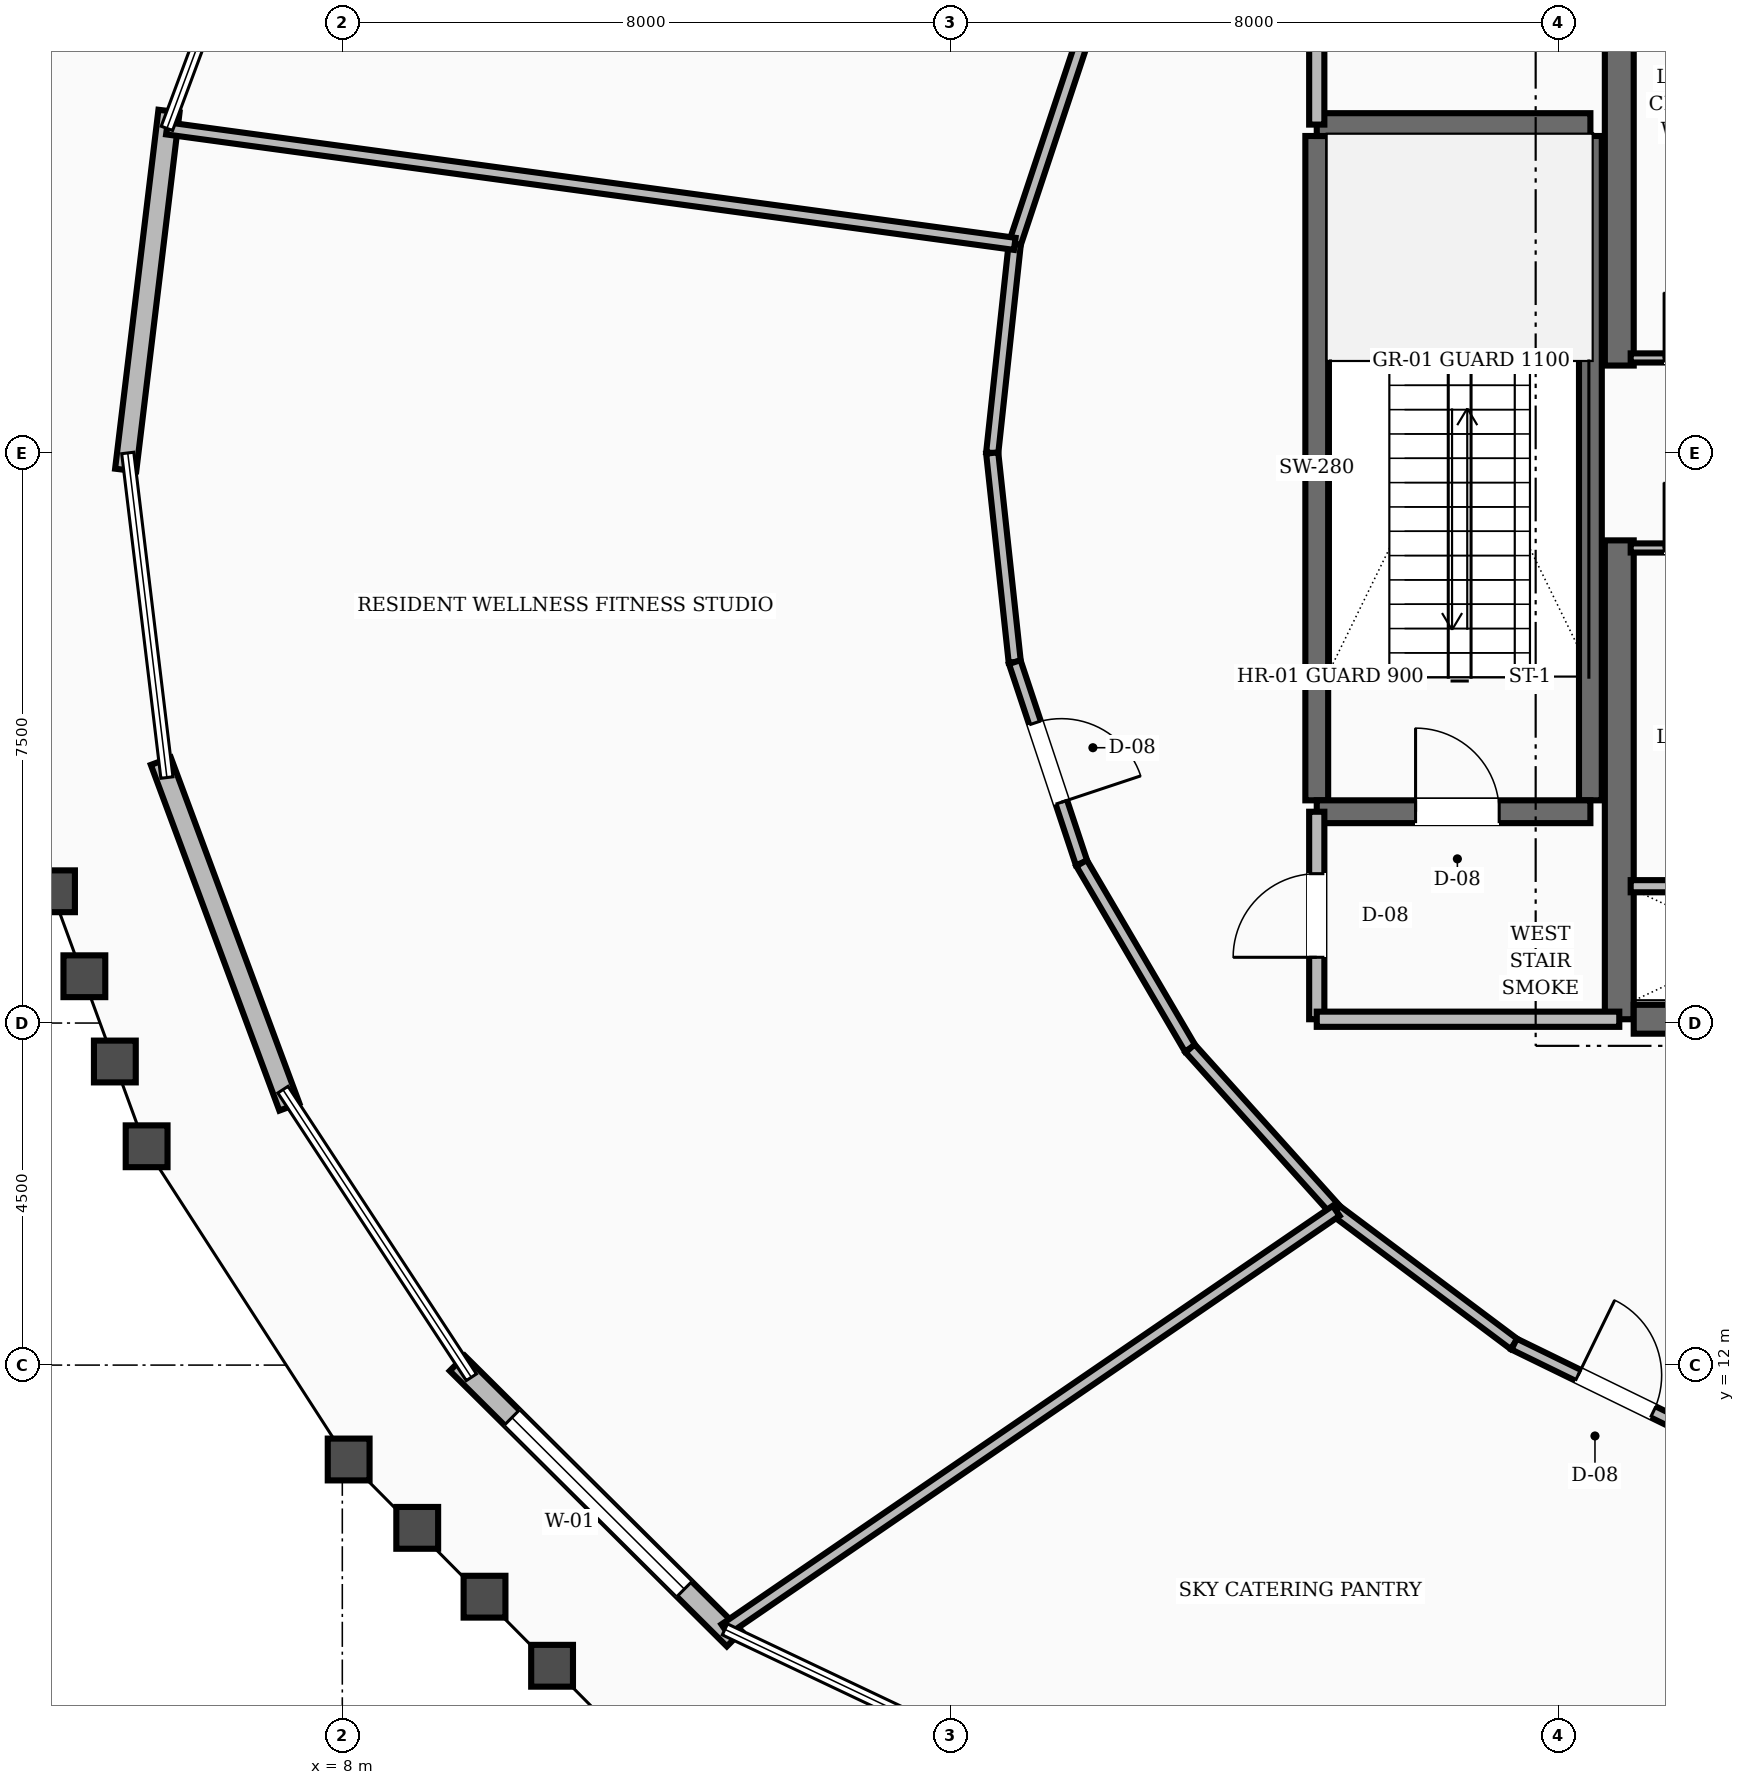
"""IFC4 building model, lengths in metres.
Left out: names, types, materials, properties, quantities, classifications, styles, units other than length and angle.
Written with IfcOpenShell. Run it as: python <this file> out.ifc"""

import sys

from ifc_helpers import new_model, si_unit, direction, frame, frame_2d, origin, place, context, subcontext, project, spatial, rectangle, extrude, element, fill, save


model = new_model("IFC4")
c1 = context("Model", 3, precision=1e-05, world=origin(), true_north=direction((0.0, 1.0)))
c2 = subcontext(c1, "Body", "Model", "MODEL_VIEW")
j1 = project(units=[si_unit("LENGTHUNIT", "METRE"), si_unit("PLANEANGLEUNIT", "RADIAN")], contexts=[c1])
p1 = place(None, origin())
s1 = spatial("IfcSite", under=j1, at=p1, CompositionType="ELEMENT")
p2 = place(p1, origin())
s2 = spatial("IfcBuilding", under=s1, at=p2, CompositionType="ELEMENT")
p3 = place(p2, frame((0.0, 0.0, 106.0)))
s3 = spatial("IfcBuildingStorey", under=s2, at=p3, CompositionType="ELEMENT", Elevation=106.0)
for number, where, z_axis, x_axis in (
    (1, (24.8, 16.55, 0.0), (0.0, 0.0, 1.0), (0.0, 1.0, 0.0)),
    (2, (24.8, 25.15, 0.0), (0.0, 0.0, 1.0), (0.0, 1.0, 0.0)),
):
    element("IfcWall", number, at=place(p3, frame(where, z_axis=z_axis, x_axis=x_axis)), inside=s3, PredefinedType="SHEAR", context=c2, shape_type="SweptSolid", body=[
        extrude(rectangle(XDim=6.3, YDim=0.38, at=frame_2d((3.15, 0.0))), origin(), (0.0, 0.0, 1.0), 4.8),
    ])
p4 = place(p3, frame((24.99, 16.55, 0.0), z_axis=(0.0, 0.0, 1.0), x_axis=(1.0, 0.0, 0.0)))
e3 = element("IfcWall", 3, at=p4, inside=s3, PredefinedType="SHEAR", context=c2, shape_type="SweptSolid", body=[
    extrude(rectangle(XDim=3.21, YDim=0.38, at=frame_2d((1.605, 0.0))), origin(), (0.0, 0.0, 1.0), 4.8),
])
for number, where, z_axis, x_axis in (
    (4, (20.82, 19.43, 0.0), (0.0, 0.0, 1.0), (0.0, 1.0, 0.0)),
    (5, (24.42, 19.43, 0.0), (0.0, 0.0, 1.0), (0.0, 1.0, 0.0)),
):
    element("IfcWall", number, at=place(p3, frame(where, z_axis=z_axis, x_axis=x_axis)), inside=s3, PredefinedType="SHEAR", context=c2, shape_type="SweptSolid", body=[
        extrude(rectangle(XDim=8.74, YDim=0.3, at=frame_2d((4.37, 0.0))), origin(), (0.0, 0.0, 1.0), 4.8),
    ])
p5 = place(p3, frame((20.82, 19.28, 0.0), z_axis=(0.0, 0.0, 1.0), x_axis=(1.0, 0.0, 0.0)))
e6 = element("IfcWall", 6, at=p5, inside=s3, PredefinedType="SHEAR", context=c2, shape_type="SweptSolid", body=[
    extrude(rectangle(XDim=3.6, YDim=0.3, at=frame_2d((1.8, 0.0))), origin(), (0.0, 0.0, 1.0), 4.8),
])
p6 = place(p5, frame((1.3, 0.0, 0.0)))
e7 = element("IfcOpeningElement", 7, at=p6, cuts=e6, PredefinedType="OPENING", context=c2, shape_type="SweptSolid", body=[
    extrude(rectangle(XDim=1.1, YDim=2.1, at=frame_2d((0.55, 1.05))), frame((0.0, 0.16, 0.0), z_axis=(0.0, -1.0, 0.0), x_axis=(1.0, 0.0, 0.0)), (0.0, 0.0, 1.0), 0.32),
])
p7 = place(p3, frame((20.82, 28.32, 0.0), z_axis=(0.0, 0.0, 1.0), x_axis=(1.0, 0.0, 0.0)))
e8 = element("IfcWall", 8, at=p7, inside=s3, PredefinedType="SHEAR", context=c2, shape_type="SweptSolid", body=[
    extrude(rectangle(XDim=3.6, YDim=0.3, at=frame_2d((1.8, 0.0))), origin(), (0.0, 0.0, 1.0), 4.8),
])
p8 = place(p3, frame((5.72, 28.498, 0.0), z_axis=(0.0, 0.0, 1.0), x_axis=(-0.119800970217, -0.992797928853, 0.0)))
e9 = element("IfcWall", 9, at=p8, inside=s3, PredefinedType="STANDARD", context=c2, shape_type="SweptSolid", body=[
    extrude(rectangle(XDim=4.756, YDim=0.28, at=frame_2d((2.378, 0.0))), origin(), (0.0, 0.0, 1.0), 3.71),
])
p9 = place(p3, frame((5.613, 19.945, 0.0), z_axis=(0.0, 0.0, 1.0), x_axis=(0.348436652238, -0.937332331341, 0.0)))
e10 = element("IfcWall", 10, at=p9, inside=s3, PredefinedType="STANDARD", context=c2, shape_type="SweptSolid", body=[
    extrude(rectangle(XDim=4.852, YDim=0.28, at=frame_2d((2.426, 0.0))), origin(), (0.0, 0.0, 1.0), 3.71),
])
p10 = place(p3, frame((9.513, 12.023, 0.0), z_axis=(0.0, 0.0, 1.0), x_axis=(0.709098752991, -0.705109181976, 0.0)))
e11 = element("IfcWall", 11, at=p10, inside=s3, PredefinedType="STANDARD", context=c2, shape_type="SweptSolid", body=[
    extrude(rectangle(XDim=5.14, YDim=0.28, at=frame_2d((2.57, 0.0))), origin(), (0.0, 0.0, 1.0), 3.71),
])
p11 = place(p10, frame((1.013, 0.0, 0.8)))
e12 = element("IfcOpeningElement", 12, at=p11, cuts=e11, PredefinedType="OPENING", context=c2, shape_type="SweptSolid", body=[
    extrude(rectangle(XDim=3.2, YDim=1.65, at=frame_2d((1.6, 0.825))), frame((0.0, 0.15, 0.0), z_axis=(0.0, -1.0, 0.0), x_axis=(1.0, 0.0, 0.0)), (0.0, 0.0, 1.0), 0.3),
])
p12 = place(p3, frame((20.82, 16.55, 0.0), z_axis=(0.0, 0.0, 1.0), x_axis=(0.0, 1.0, 0.0)))
e13 = element("IfcWall", 13, at=p12, inside=s3, PredefinedType="SOLIDWALL", context=c2, shape_type="SweptSolid", body=[
    extrude(rectangle(XDim=2.73, YDim=0.2, at=frame_2d((1.365, 0.0))), origin(), (0.0, 0.0, 1.0), 3.71),
])
p13 = place(p12, frame((0.815, 0.0, 0.0)))
e14 = element("IfcOpeningElement", 14, at=p13, cuts=e13, PredefinedType="OPENING", context=c2, shape_type="SweptSolid", body=[
    extrude(rectangle(XDim=1.1, YDim=2.1, at=frame_2d((0.55, 1.05))), frame((0.0, 0.11, 0.0), z_axis=(0.0, -1.0, 0.0), x_axis=(1.0, 0.0, 0.0)), (0.0, 0.0, 1.0), 0.22),
])
p14 = place(p3, frame((20.82, 16.55, 0.0), z_axis=(0.0, 0.0, 1.0), x_axis=(1.0, 0.0, 0.0)))
e15 = element("IfcWall", 15, at=p14, inside=s3, PredefinedType="SOLIDWALL", context=c2, shape_type="SweptSolid", body=[
    extrude(rectangle(XDim=3.98, YDim=0.2, at=frame_2d((1.99, 0.0))), origin(), (0.0, 0.0, 1.0), 3.71),
])
p15 = place(p3, frame((20.82, 28.32, 0.0), z_axis=(0.0, 0.0, 1.0), x_axis=(0.0, 1.0, 0.0)))
e16 = element("IfcWall", 16, at=p15, inside=s3, PredefinedType="SOLIDWALL", context=c2, shape_type="SweptSolid", body=[
    extrude(rectangle(XDim=3.13, YDim=0.2, at=frame_2d((1.565, 0.0))), origin(), (0.0, 0.0, 1.0), 3.71),
])
p16 = place(p15, frame((1.09, 0.0, 0.0)))
e17 = element("IfcOpeningElement", 17, at=p16, cuts=e16, PredefinedType="OPENING", context=c2, shape_type="SweptSolid", body=[
    extrude(rectangle(XDim=0.95, YDim=2.1, at=frame_2d((0.475, 1.05))), frame((0.0, 0.11, 0.0), z_axis=(0.0, -1.0, 0.0), x_axis=(1.0, 0.0, 0.0)), (0.0, 0.0, 1.0), 0.22),
])
p17 = place(p3, frame((24.95, 18.3, 0.0), z_axis=(0.0, 0.0, 1.0), x_axis=(1.0, 0.0, 0.0)))
e18 = element("IfcWall", 18, at=p17, inside=s3, PredefinedType="SOLIDWALL", context=c2, shape_type="SweptSolid", body=[
    extrude(rectangle(XDim=3.2, YDim=0.16, at=frame_2d((1.6, 0.0))), origin(), (0.0, 0.0, 1.0), 3.71),
])
p18 = place(p3, frame((24.95, 25.25, 0.0), z_axis=(0.0, 0.0, 1.0), x_axis=(1.0, 0.0, 0.0)))
e19 = element("IfcWall", 19, at=p18, inside=s3, PredefinedType="PARTITIONING", context=c2, shape_type="SweptSolid", body=[
    extrude(rectangle(XDim=3.2, YDim=0.12, at=frame_2d((1.6, 0.0))), origin(), (0.0, 0.0, 1.0), 3.71),
])
p19 = place(p18, frame((0.44, 0.0, 0.0)))
e20 = element("IfcOpeningElement", 20, at=p19, cuts=e19, PredefinedType="OPENING", context=c2, shape_type="SweptSolid", body=[
    extrude(rectangle(XDim=0.86, YDim=2.1, at=frame_2d((0.43, 1.05))), frame((0.0, 0.07, 0.0), z_axis=(0.0, -1.0, 0.0), x_axis=(1.0, 0.0, 0.0)), (0.0, 0.0, 1.0), 0.14),
])
p20 = place(p18, frame((1.9, 0.0, 0.0)))
e21 = element("IfcOpeningElement", 21, at=p20, cuts=e19, PredefinedType="OPENING", context=c2, shape_type="SweptSolid", body=[
    extrude(rectangle(XDim=0.86, YDim=2.1, at=frame_2d((0.43, 1.05))), frame((0.0, 0.07, 0.0), z_axis=(0.0, -1.0, 0.0), x_axis=(1.0, 0.0, 0.0)), (0.0, 0.0, 1.0), 0.14),
])
p21 = place(p3, frame((24.95, 22.75, 0.0), z_axis=(0.0, 0.0, 1.0), x_axis=(1.0, 0.0, 0.0)))
e22 = element("IfcWall", 22, at=p21, inside=s3, PredefinedType="PARTITIONING", context=c2, shape_type="SweptSolid", body=[
    extrude(rectangle(XDim=3.2, YDim=0.12, at=frame_2d((1.6, 0.0))), origin(), (0.0, 0.0, 1.0), 3.71),
])
p22 = place(p21, frame((0.44, 0.0, 0.0)))
e23 = element("IfcOpeningElement", 23, at=p22, cuts=e22, PredefinedType="OPENING", context=c2, shape_type="SweptSolid", body=[
    extrude(rectangle(XDim=0.86, YDim=2.1, at=frame_2d((0.43, 1.05))), frame((0.0, 0.07, 0.0), z_axis=(0.0, -1.0, 0.0), x_axis=(1.0, 0.0, 0.0)), (0.0, 0.0, 1.0), 0.14),
])
p23 = place(p21, frame((1.9, 0.0, 0.0)))
e24 = element("IfcOpeningElement", 24, at=p23, cuts=e22, PredefinedType="OPENING", context=c2, shape_type="SweptSolid", body=[
    extrude(rectangle(XDim=0.86, YDim=2.1, at=frame_2d((0.43, 1.05))), frame((0.0, 0.07, 0.0), z_axis=(0.0, -1.0, 0.0), x_axis=(1.0, 0.0, 0.0)), (0.0, 0.0, 1.0), 0.14),
])
p24 = place(p3, frame((17.726, 29.396, 0.0), z_axis=(0.0, 0.0, 1.0), x_axis=(-0.315413058649, -0.948954478589, 0.0)))
e25 = element("IfcWall", 25, at=p24, inside=s3, PredefinedType="SOLIDWALL", context=c2, shape_type="SweptSolid", body=[
    extrude(rectangle(XDim=2.787, YDim=0.16, at=frame_2d((1.394, 0.0))), origin(), (0.0, 0.0, 1.0), 3.71),
])
for number, where, z_axis, x_axis in (
    (26, (16.847, 26.751, 0.0), (0.0, 0.0, 1.0), (-0.107, -0.994, 0.0)),
    (27, (16.55, 24.0, 0.0), (0.0, 0.0, 1.0), (0.107, -0.994, 0.0)),
):
    element("IfcWall", number, at=place(p3, frame(where, z_axis=z_axis, x_axis=x_axis)), inside=s3, PredefinedType="SOLIDWALL", context=c2, shape_type="SweptSolid", body=[
        extrude(rectangle(XDim=2.767, YDim=0.16, at=frame_2d((1.383, 0.0))), origin(), (0.0, 0.0, 1.0), 3.71),
    ])
p25 = place(p3, frame((16.847, 21.249, 0.0), z_axis=(0.0, 0.0, 1.0), x_axis=(0.315413058649, -0.948954478589, 0.0)))
e28 = element("IfcWall", 28, at=p25, inside=s3, PredefinedType="SOLIDWALL", context=c2, shape_type="SweptSolid", body=[
    extrude(rectangle(XDim=2.787, YDim=0.16, at=frame_2d((1.394, 0.0))), origin(), (0.0, 0.0, 1.0), 3.71),
])
p26 = place(p25, frame((0.844, 0.0, 0.0)))
e29 = element("IfcOpeningElement", 29, at=p26, cuts=e28, PredefinedType="OPENING", context=c2, shape_type="SweptSolid", body=[
    extrude(rectangle(XDim=1.1, YDim=2.1, at=frame_2d((0.55, 1.05))), frame((0.0, 0.09, 0.0), z_axis=(0.0, -1.0, 0.0), x_axis=(1.0, 0.0, 0.0)), (0.0, 0.0, 1.0), 0.18),
])
p27 = place(p3, frame((17.726, 18.604, 0.0), z_axis=(0.0, 0.0, 1.0), x_axis=(0.505380130961, -0.862896820732, 0.0)))
e30 = element("IfcWall", 30, at=p27, inside=s3, PredefinedType="SOLIDWALL", context=c2, shape_type="SweptSolid", body=[
    extrude(rectangle(XDim=2.825, YDim=0.16, at=frame_2d((1.413, 0.0))), origin(), (0.0, 0.0, 1.0), 3.71),
])
p28 = place(p3, frame((19.154, 16.167, 0.0), z_axis=(0.0, 0.0, 1.0), x_axis=(0.668645478294, -0.743581350194, 0.0)))
e31 = element("IfcWall", 31, at=p28, inside=s3, PredefinedType="SOLIDWALL", context=c2, shape_type="SweptSolid", body=[
    extrude(rectangle(XDim=2.874, YDim=0.16, at=frame_2d((1.437, 0.0))), origin(), (0.0, 0.0, 1.0), 3.71),
])
p29 = place(p3, frame((21.075, 14.03, 0.0), z_axis=(0.0, 0.0, 1.0), x_axis=(0.800420462314, -0.599438973966, 0.0)))
e32 = element("IfcWall", 32, at=p29, inside=s3, PredefinedType="SOLIDWALL", context=c2, shape_type="SweptSolid", body=[
    extrude(rectangle(XDim=2.925, YDim=0.16, at=frame_2d((1.462, 0.0))), origin(), (0.0, 0.0, 1.0), 3.71),
])
p30 = place(p3, frame((23.417, 12.276, 0.0), z_axis=(0.0, 0.0, 1.0), x_axis=(0.898755022802, -0.438451147778, 0.0)))
e33 = element("IfcWall", 33, at=p30, inside=s3, PredefinedType="SOLIDWALL", context=c2, shape_type="SweptSolid", body=[
    extrude(rectangle(XDim=2.972, YDim=0.16, at=frame_2d((1.486, 0.0))), origin(), (0.0, 0.0, 1.0), 3.71),
])
p31 = place(p30, frame((0.936, 0.0, 0.0)))
e34 = element("IfcOpeningElement", 34, at=p31, cuts=e33, PredefinedType="OPENING", context=c2, shape_type="SweptSolid", body=[
    extrude(rectangle(XDim=1.1, YDim=2.1, at=frame_2d((0.55, 1.05))), frame((0.0, 0.09, 0.0), z_axis=(0.0, -1.0, 0.0), x_axis=(1.0, 0.0, 0.0)), (0.0, 0.0, 1.0), 0.18),
])
p32 = place(p3, frame((16.847, 26.751, 0.0), z_axis=(0.0, 0.0, 1.0), x_axis=(-0.99084850252, 0.134978683703, 0.0)))
e35 = element("IfcWall", 35, at=p32, inside=s3, PredefinedType="SOLIDWALL", context=c2, shape_type="SweptSolid", body=[
    extrude(rectangle(XDim=11.258, YDim=0.16, at=frame_2d((5.629, 0.0))), origin(), (0.0, 0.0, 1.0), 3.71),
])
p33 = place(p3, frame((21.075, 14.03, 0.0), z_axis=(0.0, 0.0, 1.0), x_axis=(-0.825084174335, -0.56500982758, 0.0)))
e36 = element("IfcWall", 36, at=p33, inside=s3, PredefinedType="SOLIDWALL", context=c2, shape_type="SweptSolid", body=[
    extrude(rectangle(XDim=9.747, YDim=0.16, at=frame_2d((4.874, 0.0))), origin(), (0.0, 0.0, 1.0), 3.71),
])
p34 = place(p11, origin())
e37 = element("IfcWindow", 37, at=p34, inside=s3, PartitioningType="SINGLE_PANEL", PredefinedType="WINDOW", context=c2, shape_type="SweptSolid", body=[
    extrude(rectangle(XDim=3.2, YDim=1.65, at=frame_2d((1.6, 0.825))), frame((0.0, 0.03, 0.0), z_axis=(0.0, -1.0, 0.0), x_axis=(1.0, 0.0, 0.0)), (0.0, 0.0, 1.0), 0.06),
])
fill(e12, e37)
p35 = place(p6, origin())
e38 = element("IfcDoor", 38, at=p35, inside=s3, OperationType="SINGLE_SWING_LEFT", PredefinedType="DOOR", context=c2, shape_type="SweptSolid", body=[
    extrude(rectangle(XDim=1.1, YDim=2.1, at=frame_2d((0.55, 1.05))), frame((0.0, 0.025, 0.0), z_axis=(0.0, -1.0, 0.0), x_axis=(1.0, 0.0, 0.0)), (0.0, 0.0, 1.0), 0.05),
])
fill(e7, e38)
p36 = place(p13, origin())
e39 = element("IfcDoor", 39, at=p36, inside=s3, OperationType="SINGLE_SWING_LEFT", PredefinedType="DOOR", context=c2, shape_type="SweptSolid", body=[
    extrude(rectangle(XDim=1.1, YDim=2.1, at=frame_2d((0.55, 1.05))), frame((0.0, 0.025, 0.0), z_axis=(0.0, -1.0, 0.0), x_axis=(1.0, 0.0, 0.0)), (0.0, 0.0, 1.0), 0.05),
])
fill(e14, e39)
p37 = place(p19, origin())
e40 = element("IfcDoor", 40, at=p37, inside=s3, OperationType="SINGLE_SWING_LEFT", PredefinedType="DOOR", context=c2, shape_type="SweptSolid", body=[
    extrude(rectangle(XDim=0.86, YDim=2.1, at=frame_2d((0.43, 1.05))), frame((0.0, 0.025, 0.0), z_axis=(0.0, -1.0, 0.0), x_axis=(1.0, 0.0, 0.0)), (0.0, 0.0, 1.0), 0.05),
])
fill(e20, e40)
p38 = place(p22, origin())
e41 = element("IfcDoor", 41, at=p38, inside=s3, OperationType="SINGLE_SWING_LEFT", PredefinedType="DOOR", context=c2, shape_type="SweptSolid", body=[
    extrude(rectangle(XDim=0.86, YDim=2.1, at=frame_2d((0.43, 1.05))), frame((0.0, 0.025, 0.0), z_axis=(0.0, -1.0, 0.0), x_axis=(1.0, 0.0, 0.0)), (0.0, 0.0, 1.0), 0.05),
])
fill(e23, e41)
p39 = place(p26, origin())
e42 = element("IfcDoor", 42, at=p39, inside=s3, OperationType="SINGLE_SWING_RIGHT", PredefinedType="DOOR", context=c2, shape_type="SweptSolid", body=[
    extrude(rectangle(XDim=1.1, YDim=2.1, at=frame_2d((0.55, 1.05))), frame((0.0, 0.025, 0.0), z_axis=(0.0, -1.0, 0.0), x_axis=(1.0, 0.0, 0.0)), (0.0, 0.0, 1.0), 0.05),
])
fill(e29, e42)
p40 = place(p31, origin())
e43 = element("IfcDoor", 43, at=p40, inside=s3, OperationType="SINGLE_SWING_LEFT", PredefinedType="DOOR", context=c2, shape_type="SweptSolid", body=[
    extrude(rectangle(XDim=1.1, YDim=2.1, at=frame_2d((0.55, 1.05))), frame((0.0, 0.025, 0.0), z_axis=(0.0, -1.0, 0.0), x_axis=(1.0, 0.0, 0.0)), (0.0, 0.0, 1.0), 0.05),
])
fill(e34, e43)
save(model, sys.argv[1])
